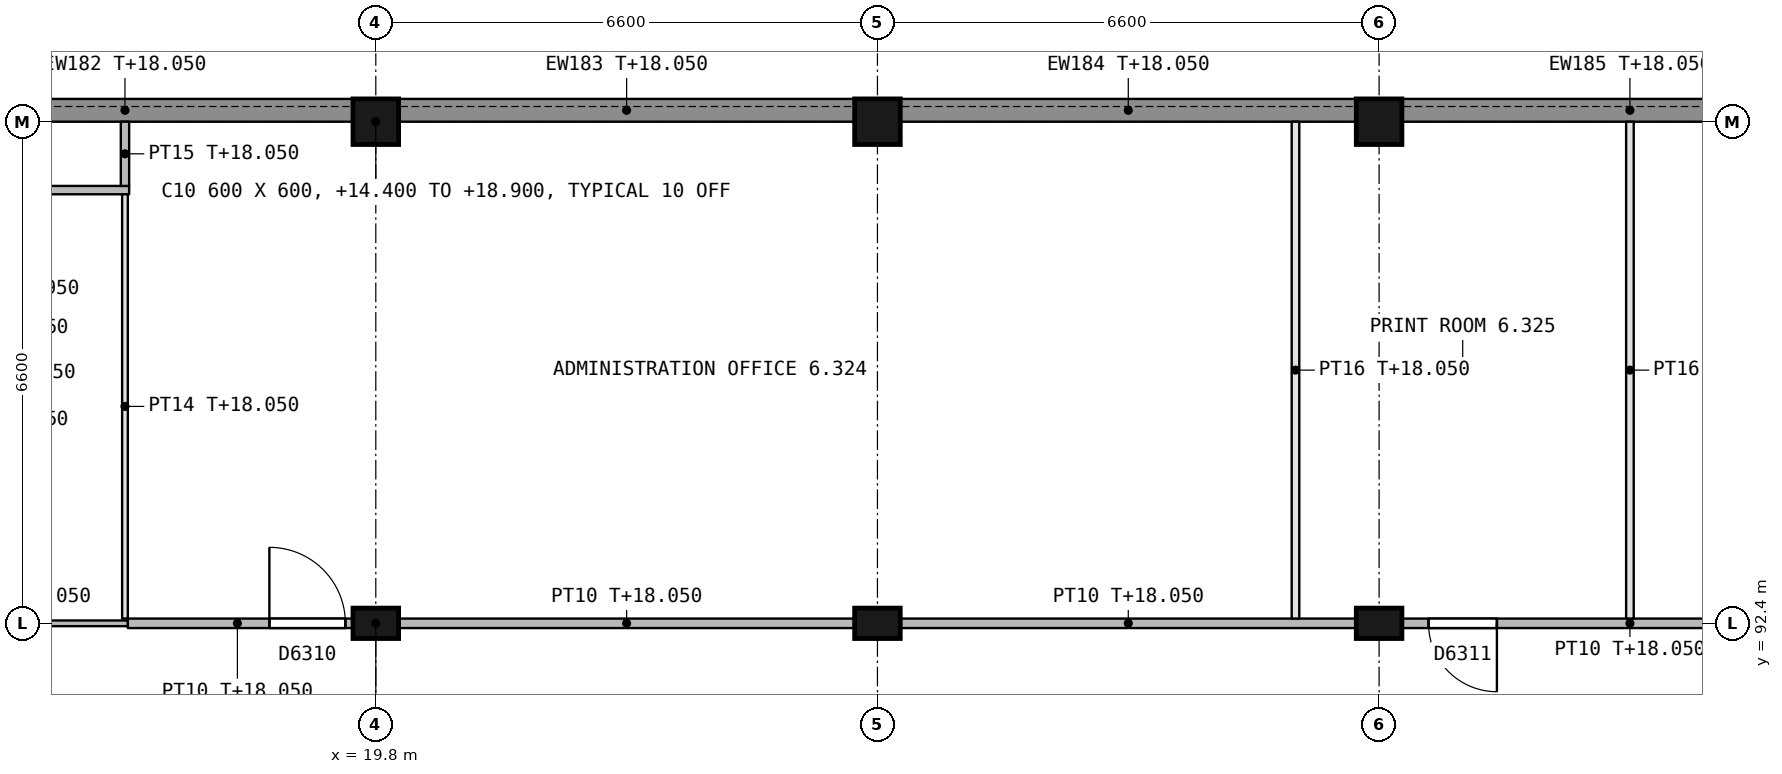
"""IFC4 building model, lengths in metres.
Left out: names, types, materials, properties, quantities, classifications, styles, units other than length and angle.
Written with IfcOpenShell. Run it as: python <this file> out.ifc"""

import sys

from ifc_helpers import new_model, si_unit, direction, frame, frame_2d, origin, origin_2d, place, context, subcontext, project, spatial, rectangle, extrude, element, fill, save


model = new_model("IFC4")
c1 = context("Model", 3, precision=1e-05, world=origin(), true_north=direction((0.0, 1.0)))
c2 = subcontext(c1, "Body", "Model", "MODEL_VIEW")
j1 = project(units=[si_unit("LENGTHUNIT", "METRE"), si_unit("PLANEANGLEUNIT", "RADIAN")], contexts=[c1])
p1 = place(None, origin())
s1 = spatial("IfcSite", under=j1, at=p1, CompositionType="ELEMENT")
p2 = place(p1, origin())
s2 = spatial("IfcBuilding", under=s1, at=p2, CompositionType="ELEMENT")
p3 = place(p2, frame((0.0, 0.0, 14.4)))
s3 = spatial("IfcBuildingStorey", under=s2, at=p3, CompositionType="ELEMENT", Elevation=14.4)
p4 = place(p3, frame((19.8, 92.4, 0.0), z_axis=(0.0, 0.0, 1.0), x_axis=(1.0, 0.0, 0.0)))
e1 = element("IfcColumn", 1, at=p4, inside=s3, PredefinedType="COLUMN", context=c2, shape_type="SweptSolid", body=[
    extrude(rectangle(XDim=0.6, YDim=0.4, at=origin_2d()), origin(), (0.0, 0.0, 1.0), 4.5),
])
p5 = place(p3, frame((19.8, 99.0, 0.0), z_axis=(0.0, 0.0, 1.0), x_axis=(1.0, 0.0, 0.0)))
e2 = element("IfcColumn", 2, at=p5, inside=s3, PredefinedType="COLUMN", context=c2, shape_type="SweptSolid", body=[
    extrude(rectangle(XDim=0.6, YDim=0.6, at=origin_2d()), origin(), (0.0, 0.0, 1.0), 4.5),
])
p6 = place(p3, frame((26.4, 92.4, 0.0), z_axis=(0.0, 0.0, 1.0), x_axis=(1.0, 0.0, 0.0)))
e3 = element("IfcColumn", 3, at=p6, inside=s3, PredefinedType="COLUMN", context=c2, shape_type="SweptSolid", body=[
    extrude(rectangle(XDim=0.6, YDim=0.4, at=origin_2d()), origin(), (0.0, 0.0, 1.0), 4.5),
])
p7 = place(p3, frame((26.4, 99.0, 0.0), z_axis=(0.0, 0.0, 1.0), x_axis=(1.0, 0.0, 0.0)))
e4 = element("IfcColumn", 4, at=p7, inside=s3, PredefinedType="COLUMN", context=c2, shape_type="SweptSolid", body=[
    extrude(rectangle(XDim=0.6, YDim=0.6, at=origin_2d()), origin(), (0.0, 0.0, 1.0), 4.5),
])
p8 = place(p3, frame((33.0, 92.4, 0.0), z_axis=(0.0, 0.0, 1.0), x_axis=(1.0, 0.0, 0.0)))
e5 = element("IfcColumn", 5, at=p8, inside=s3, PredefinedType="COLUMN", context=c2, shape_type="SweptSolid", body=[
    extrude(rectangle(XDim=0.6, YDim=0.4, at=origin_2d()), origin(), (0.0, 0.0, 1.0), 4.5),
])
p9 = place(p3, frame((33.0, 99.0, 0.0), z_axis=(0.0, 0.0, 1.0), x_axis=(1.0, 0.0, 0.0)))
e6 = element("IfcColumn", 6, at=p9, inside=s3, PredefinedType="COLUMN", context=c2, shape_type="SweptSolid", body=[
    extrude(rectangle(XDim=0.6, YDim=0.6, at=origin_2d()), origin(), (0.0, 0.0, 1.0), 4.5),
])
for number, where, z_axis, x_axis in (
    (7, (13.5, 99.15, 0.0), (0.0, 0.0, 1.0), (1.0, 0.0, 0.0)),
    (8, (20.1, 99.15, 0.0), (0.0, 0.0, 1.0), (1.0, 0.0, 0.0)),
    (9, (26.7, 99.15, 0.0), (0.0, 0.0, 1.0), (1.0, 0.0, 0.0)),
    (10, (33.3, 99.15, 0.0), (0.0, 0.0, 1.0), (1.0, 0.0, 0.0)),
):
    element("IfcWall", number, at=place(p3, frame(where, z_axis=z_axis, x_axis=x_axis)), inside=s3, PredefinedType="STANDARD", context=c2, shape_type="SweptSolid", body=[
        extrude(rectangle(XDim=6.0, YDim=0.3, at=frame_2d((3.0, 0.0))), origin(), (0.0, 0.0, 1.0), 3.65),
    ])
p10 = place(p3, frame((13.5, 92.4, 0.0), z_axis=(0.0, 0.0, 1.0), x_axis=(1.0, 0.0, 0.0)))
e11 = element("IfcWall", 11, at=p10, inside=s3, PredefinedType="PARTITIONING", context=c2, shape_type="SweptSolid", body=[
    extrude(rectangle(XDim=3.038, YDim=0.075, at=frame_2d((1.519, 0.0))), origin(), (0.0, 0.0, 1.0), 3.65),
])
p11 = place(p3, frame((16.538, 92.4, 0.0), z_axis=(0.0, 0.0, 1.0), x_axis=(1.0, 0.0, 0.0)))
e12 = element("IfcWall", 12, at=p11, inside=s3, PredefinedType="PARTITIONING", context=c2, shape_type="SweptSolid", body=[
    extrude(rectangle(XDim=2.962, YDim=0.125, at=frame_2d((1.481, 0.0))), origin(), (0.0, 0.0, 1.0), 3.65),
])
p12 = place(p11, frame((1.862, 0.0, 0.0)))
e13 = element("IfcOpeningElement", 13, at=p12, cuts=e12, PredefinedType="OPENING", context=c2, shape_type="SweptSolid", body=[
    extrude(rectangle(XDim=1.0, YDim=2.1, at=frame_2d((0.5, 1.05))), frame((0.0, 0.073, 0.0), z_axis=(0.0, -1.0, 0.0), x_axis=(1.0, 0.0, 0.0)), (0.0, 0.0, 1.0), 0.145),
])
for number, where, z_axis, x_axis in (
    (14, (20.1, 92.4, 0.0), (0.0, 0.0, 1.0), (1.0, 0.0, 0.0)),
    (15, (26.7, 92.4, 0.0), (0.0, 0.0, 1.0), (1.0, 0.0, 0.0)),
):
    element("IfcWall", number, at=place(p3, frame(where, z_axis=z_axis, x_axis=x_axis)), inside=s3, PredefinedType="PARTITIONING", context=c2, shape_type="SweptSolid", body=[
        extrude(rectangle(XDim=6.0, YDim=0.125, at=frame_2d((3.0, 0.0))), origin(), (0.0, 0.0, 1.0), 3.65),
    ])
p13 = place(p3, frame((33.3, 92.4, 0.0), z_axis=(0.0, 0.0, 1.0), x_axis=(1.0, 0.0, 0.0)))
e16 = element("IfcWall", 16, at=p13, inside=s3, PredefinedType="PARTITIONING", context=c2, shape_type="SweptSolid", body=[
    extrude(rectangle(XDim=6.0, YDim=0.125, at=frame_2d((3.0, 0.0))), origin(), (0.0, 0.0, 1.0), 3.65),
])
p14 = place(p13, frame((0.35, 0.0, 0.0)))
e17 = element("IfcOpeningElement", 17, at=p14, cuts=e16, PredefinedType="OPENING", context=c2, shape_type="SweptSolid", body=[
    extrude(rectangle(XDim=0.9, YDim=2.1, at=frame_2d((0.45, 1.05))), frame((0.0, 0.073, 0.0), z_axis=(0.0, -1.0, 0.0), x_axis=(1.0, 0.0, 0.0)), (0.0, 0.0, 1.0), 0.145),
])
p15 = place(p13, frame((4.2, 0.0, 0.0)))
e18 = element("IfcOpeningElement", 18, at=p15, cuts=e16, PredefinedType="OPENING", context=c2, shape_type="SweptSolid", body=[
    extrude(rectangle(XDim=0.9, YDim=2.1, at=frame_2d((0.45, 1.05))), frame((0.0, 0.073, 0.0), z_axis=(0.0, -1.0, 0.0), x_axis=(1.0, 0.0, 0.0)), (0.0, 0.0, 1.0), 0.145),
])
p16 = place(p3, frame((16.555, 98.1, 0.0), z_axis=(0.0, 0.0, 1.0), x_axis=(-1.0, 0.0, 0.0)))
e19 = element("IfcWall", 19, at=p16, inside=s3, PredefinedType="PARTITIONING", context=c2, shape_type="SweptSolid", body=[
    extrude(rectangle(XDim=3.3, YDim=0.11, at=frame_2d((1.65, 0.0))), origin(), (0.0, 0.0, 1.0), 3.55),
])
p17 = place(p16, frame((1.405, 0.0, 0.0)))
e20 = element("IfcOpeningElement", 20, at=p17, cuts=e19, PredefinedType="OPENING", context=c2, shape_type="SweptSolid", body=[
    extrude(rectangle(XDim=0.6, YDim=2.1, at=frame_2d((0.3, 1.05))), frame((0.0, 0.065, 0.0), z_axis=(0.0, -1.0, 0.0), x_axis=(1.0, 0.0, 0.0)), (0.0, 0.0, 1.0), 0.13),
])
p18 = place(p3, frame((16.5, 92.463, 0.0), z_axis=(0.0, 0.0, 1.0), x_axis=(0.0, 1.0, 0.0)))
e21 = element("IfcWall", 21, at=p18, inside=s3, PredefinedType="PARTITIONING", context=c2, shape_type="SweptSolid", body=[
    extrude(rectangle(XDim=5.582, YDim=0.075, at=frame_2d((2.791, 0.0))), origin(), (0.0, 0.0, 1.0), 3.65),
])
p19 = place(p3, frame((16.5, 98.155, 0.0), z_axis=(0.0, 0.0, 1.0), x_axis=(0.0, 1.0, 0.0)))
e22 = element("IfcWall", 22, at=p19, inside=s3, PredefinedType="PARTITIONING", context=c2, shape_type="SweptSolid", body=[
    extrude(rectangle(XDim=0.845, YDim=0.11, at=frame_2d((0.422, 0.0))), origin(), (0.0, 0.0, 1.0), 3.65),
])
for number, where, z_axis, x_axis in (
    (23, (31.9, 92.463, 0.0), (0.0, 0.0, 1.0), (0.0, 1.0, 0.0)),
    (24, (36.3, 92.463, 0.0), (0.0, 0.0, 1.0), (0.0, 1.0, 0.0)),
):
    element("IfcWall", number, at=place(p3, frame(where, z_axis=z_axis, x_axis=x_axis)), inside=s3, PredefinedType="PARTITIONING", context=c2, shape_type="SweptSolid", body=[
        extrude(rectangle(XDim=6.537, YDim=0.1, at=frame_2d((3.269, 0.0))), origin(), (0.0, 0.0, 1.0), 3.65),
    ])
p20 = place(p12, origin())
e25 = element("IfcDoor", 25, at=p20, inside=s3, OperationType="SINGLE_SWING_LEFT", PredefinedType="DOOR", context=c2, shape_type="SweptSolid", body=[
    extrude(rectangle(XDim=1.0, YDim=2.1, at=frame_2d((0.5, 1.05))), frame((0.0, 0.025, 0.0), z_axis=(0.0, -1.0, 0.0), x_axis=(1.0, 0.0, 0.0)), (0.0, 0.0, 1.0), 0.05),
])
fill(e13, e25)
p21 = place(p14, origin())
e26 = element("IfcDoor", 26, at=p21, inside=s3, OperationType="SINGLE_SWING_RIGHT", PredefinedType="DOOR", context=c2, shape_type="SweptSolid", body=[
    extrude(rectangle(XDim=0.9, YDim=2.1, at=frame_2d((0.45, 1.05))), frame((0.0, 0.025, 0.0), z_axis=(0.0, -1.0, 0.0), x_axis=(1.0, 0.0, 0.0)), (0.0, 0.0, 1.0), 0.05),
])
fill(e17, e26)
save(model, sys.argv[1])
